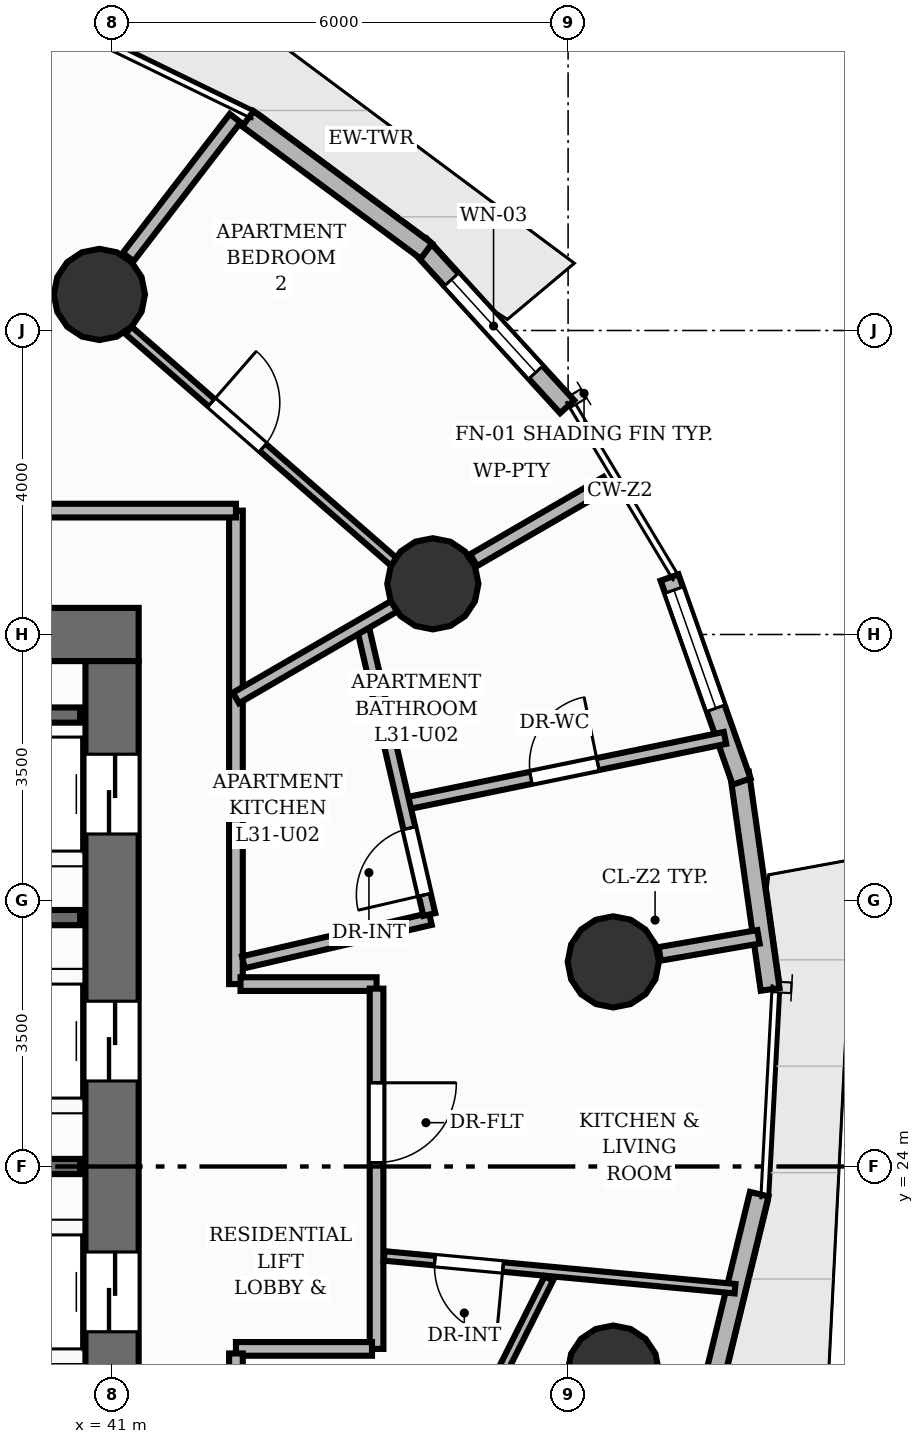
"""IFC4 building model, lengths in metres.
Left out: names, types, materials, properties, quantities, classifications, styles, units other than length and angle.
Written with IfcOpenShell. Run it as: python <this file> out.ifc"""

import sys

from ifc_helpers import new_model, si_unit, direction, frame, frame_2d, origin, origin_2d, place, context, subcontext, project, spatial, rectangle, circle, extrude, element, fill, save


model = new_model("IFC4")
c1 = context("Model", 3, precision=1e-05, world=origin(), true_north=direction((0.0, 1.0)))
c2 = subcontext(c1, "Body", "Model", "MODEL_VIEW")
j1 = project(units=[si_unit("LENGTHUNIT", "METRE"), si_unit("PLANEANGLEUNIT", "RADIAN")], contexts=[c1])
p1 = place(None, origin())
s1 = spatial("IfcSite", under=j1, at=p1, CompositionType="ELEMENT")
p2 = place(p1, origin())
s2 = spatial("IfcBuilding", under=s1, at=p2, CompositionType="ELEMENT")
p3 = place(p2, frame((0.0, 0.0, 106.08)))
s3 = spatial("IfcBuildingStorey", under=s2, at=p3, CompositionType="ELEMENT", Elevation=106.08)
p4 = place(p3, frame((22.65, 31.0, 0.0), z_axis=(0.0, 0.0, 1.0), x_axis=(1.0, 0.0, 0.0)))
e1 = element("IfcWall", 1, at=p4, inside=s3, PredefinedType="SHEAR", context=c2, shape_type="SweptSolid", body=[
    extrude(rectangle(XDim=18.7, YDim=0.7, at=frame_2d((9.35, 0.0))), origin(), (0.0, 0.0, 1.0), 3.2),
])
p5 = place(p4, frame((11.75, 0.0, 0.0)))
e2 = element("IfcOpeningElement", 2, at=p5, cuts=e1, PredefinedType="OPENING", context=c2, shape_type="SweptSolid", body=[
    extrude(rectangle(XDim=1.1, YDim=2.15, at=frame_2d((0.55, 1.075))), frame((0.0, 0.36, 0.0), z_axis=(0.0, -1.0, 0.0), x_axis=(1.0, 0.0, 0.0)), (0.0, 0.0, 1.0), 0.72),
])
p6 = place(p3, frame((41.0, 17.35, 0.0), z_axis=(0.0, 0.0, 1.0), x_axis=(0.0, 1.0, 0.0)))
e3 = element("IfcWall", 3, at=p6, inside=s3, PredefinedType="SHEAR", context=c2, shape_type="SweptSolid", body=[
    extrude(rectangle(XDim=13.3, YDim=0.7, at=frame_2d((6.65, 0.0))), origin(), (0.0, 0.0, 1.0), 3.2),
])
p7 = place(p6, frame((1.225, 0.0, 0.0)))
e4 = element("IfcOpeningElement", 4, at=p7, cuts=e3, PredefinedType="OPENING", context=c2, shape_type="SweptSolid", body=[
    extrude(rectangle(XDim=1.05, YDim=2.15, at=frame_2d((0.525, 1.075))), frame((0.0, 0.36, 0.0), z_axis=(0.0, -1.0, 0.0), x_axis=(1.0, 0.0, 0.0)), (0.0, 0.0, 1.0), 0.72),
])
p8 = place(p6, frame((4.475, 0.0, 0.0)))
e5 = element("IfcOpeningElement", 5, at=p8, cuts=e3, PredefinedType="OPENING", context=c2, shape_type="SweptSolid", body=[
    extrude(rectangle(XDim=1.05, YDim=2.15, at=frame_2d((0.525, 1.075))), frame((0.0, 0.36, 0.0), z_axis=(0.0, -1.0, 0.0), x_axis=(1.0, 0.0, 0.0)), (0.0, 0.0, 1.0), 0.72),
])
p9 = place(p6, frame((7.775, 0.0, 0.0)))
e6 = element("IfcOpeningElement", 6, at=p9, cuts=e3, PredefinedType="OPENING", context=c2, shape_type="SweptSolid", body=[
    extrude(rectangle(XDim=1.05, YDim=2.15, at=frame_2d((0.525, 1.075))), frame((0.0, 0.36, 0.0), z_axis=(0.0, -1.0, 0.0), x_axis=(1.0, 0.0, 0.0)), (0.0, 0.0, 1.0), 0.72),
])
p10 = place(p6, frame((11.025, 0.0, 0.0)))
e7 = element("IfcOpeningElement", 7, at=p10, cuts=e3, PredefinedType="OPENING", context=c2, shape_type="SweptSolid", body=[
    extrude(rectangle(XDim=1.05, YDim=2.15, at=frame_2d((0.525, 1.075))), frame((0.0, 0.36, 0.0), z_axis=(0.0, -1.0, 0.0), x_axis=(1.0, 0.0, 0.0)), (0.0, 0.0, 1.0), 0.72),
])
for number, where, z_axis, x_axis in (
    (8, (47.594, 26.692, 0.0), (0.0, 0.0, 1.0), (1.0, 0.0, 0.0)),
    (9, (45.22, 31.667, 0.0), (0.0, 0.0, 1.0), (1.0, 0.0, 0.0)),
    (10, (40.833, 35.474, 0.0), (0.0, 0.0, 1.0), (1.0, 0.0, 0.0)),
    (11, (47.594, 21.308, 0.0), (0.0, 0.0, 1.0), (1.0, 0.0, 0.0)),
):
    element("IfcColumn", number, at=place(p3, frame(where, z_axis=z_axis, x_axis=x_axis)), inside=s3, PredefinedType="COLUMN", context=c2, shape_type="SweptSolid", body=[
        extrude(circle(Radius=0.6, at=origin_2d()), origin(), (0.0, 0.0, 1.0), 3.2),
    ])
p11 = place(p3, frame((45.051, 36.121, 0.0), z_axis=(0.0, 0.0, 1.0), x_axis=(0.673691100196, -0.739013059098, 0.0)))
e12 = element("IfcWall", 12, at=p11, inside=s3, PredefinedType="SOLIDWALL", context=c2, shape_type="SweptSolid", body=[
    extrude(rectangle(XDim=2.874, YDim=0.25, at=frame_2d((1.437, 0.0))), origin(), (0.0, 0.0, 1.0), 2.96),
])
p12 = place(p11, frame((0.612, 0.0, 0.85)))
e13 = element("IfcOpeningElement", 13, at=p12, cuts=e12, PredefinedType="OPENING", context=c2, shape_type="SweptSolid", body=[
    extrude(rectangle(XDim=1.65, YDim=1.55, at=frame_2d((0.825, 0.775))), frame((0.0, 0.135, 0.0), z_axis=(0.0, -1.0, 0.0), x_axis=(1.0, 0.0, 0.0)), (0.0, 0.0, 1.0), 0.27),
])
p13 = place(p3, frame((42.787, 37.785, 0.0), z_axis=(0.0, 0.0, 1.0), x_axis=(0.803255279066, -0.595634918933, 0.0)))
e14 = element("IfcWall", 14, at=p13, inside=s3, PredefinedType="SOLIDWALL", context=c2, shape_type="SweptSolid", body=[
    extrude(rectangle(XDim=2.923, YDim=0.25, at=frame_2d((1.462, 0.0))), origin(), (0.0, 0.0, 1.0), 2.96),
])
p14 = place(p3, frame((49.514, 23.636, 0.0), z_axis=(0.0, 0.0, 1.0), x_axis=(-0.236668427837, -0.971590477138, 0.0)))
e15 = element("IfcWall", 15, at=p14, inside=s3, PredefinedType="SOLIDWALL", context=c2, shape_type="SweptSolid", body=[
    extrude(rectangle(XDim=2.989, YDim=0.25, at=frame_2d((1.494, 0.0))), origin(), (0.0, 0.0, 1.0), 2.96),
])
p15 = place(p3, frame((49.256, 29.176, 0.0), z_axis=(0.0, 0.0, 1.0), x_axis=(0.139982311006, -0.990154004489, 0.0)))
e16 = element("IfcWall", 16, at=p15, inside=s3, PredefinedType="SOLIDWALL", context=c2, shape_type="SweptSolid", body=[
    extrude(rectangle(XDim=2.874, YDim=0.25, at=frame_2d((1.437, 0.0))), origin(), (0.0, 0.0, 1.0), 2.96),
])
p16 = place(p3, frame((48.335, 31.75, 0.0), z_axis=(0.0, 0.0, 1.0), x_axis=(0.332923265962, -0.942953921982, 0.0)))
e17 = element("IfcWall", 17, at=p16, inside=s3, PredefinedType="SOLIDWALL", context=c2, shape_type="SweptSolid", body=[
    extrude(rectangle(XDim=2.847, YDim=0.25, at=frame_2d((1.424, 0.0))), origin(), (0.0, 0.0, 1.0), 2.96),
])
p17 = place(p16, frame((0.175, 0.0, 0.85)))
e18 = element("IfcOpeningElement", 18, at=p17, cuts=e17, PredefinedType="OPENING", context=c2, shape_type="SweptSolid", body=[
    extrude(rectangle(XDim=1.65, YDim=1.55, at=frame_2d((0.825, 0.775))), frame((0.0, 0.135, 0.0), z_axis=(0.0, -1.0, 0.0), x_axis=(1.0, 0.0, 0.0)), (0.0, 0.0, 1.0), 0.27),
])
for number, where, z_axis, x_axis in (
    (19, (38.87, 29.94, 0.0), (0.0, 0.0, 1.0), (1.0, 0.0, 0.0)),
    (20, (38.87, 24.0, 0.0), (0.0, 0.0, 1.0), (1.0, 0.0, 0.0)),
    (21, (38.87, 27.275, 0.0), (0.0, 0.0, 1.0), (1.0, 0.0, 0.0)),
):
    element("IfcWall", number, at=place(p3, frame(where, z_axis=z_axis, x_axis=x_axis)), inside=s3, PredefinedType="SHEAR", context=c2, shape_type="SweptSolid", body=[
        extrude(rectangle(XDim=1.71, YDim=0.2, at=frame_2d((0.855, 0.0))), origin(), (0.0, 0.0, 1.0), 3.2),
    ])
p18 = place(p3, frame((48.206, 26.798, 0.0), z_axis=(0.0, 0.0, 1.0), x_axis=(0.98541625201, 0.170161130326, 0.0)))
e22 = element("IfcWall", 22, at=p18, inside=s3, PredefinedType="PARTITIONING", context=c2, shape_type="SweptSolid", body=[
    extrude(rectangle(XDim=1.319, YDim=0.18, at=frame_2d((0.659, 0.0))), origin(), (0.0, 0.0, 1.0), 2.26),
])
p19 = place(p3, frame((45.757, 31.978, 0.0), z_axis=(0.0, 0.0, 1.0), x_axis=(0.865046864493, 0.501691062539, 0.0)))
e23 = element("IfcWall", 23, at=p19, inside=s3, PredefinedType="PARTITIONING", context=c2, shape_type="SweptSolid", body=[
    extrude(rectangle(XDim=2.028, YDim=0.18, at=frame_2d((1.014, 0.0))), origin(), (0.0, 0.0, 1.0), 2.26),
])
p20 = place(p3, frame((41.212, 35.966, 0.0), z_axis=(0.0, 0.0, 1.0), x_axis=(0.610007255548, 0.792395827967, 0.0)))
e24 = element("IfcWall", 24, at=p20, inside=s3, PredefinedType="PARTITIONING", context=c2, shape_type="SweptSolid", body=[
    extrude(rectangle(XDim=2.308, YDim=0.18, at=frame_2d((1.154, 0.0))), origin(), (0.0, 0.0, 1.0), 2.26),
])
p21 = place(p3, frame((42.63, 32.63, 0.0), z_axis=(0.0, 0.0, 1.0), x_axis=(0.0, -1.0, 0.0)))
e25 = element("IfcWall", 25, at=p21, inside=s3, PredefinedType="PARTITIONING", context=c2, shape_type="SweptSolid", body=[
    extrude(rectangle(XDim=6.23, YDim=0.18, at=frame_2d((3.115, 0.0))), origin(), (0.0, 0.0, 1.0), 2.955),
])
p22 = place(p3, frame((42.69, 26.4, 0.0), z_axis=(0.0, 0.0, 1.0), x_axis=(1.0, 0.0, 0.0)))
e26 = element("IfcWall", 26, at=p22, inside=s3, PredefinedType="PARTITIONING", context=c2, shape_type="SweptSolid", body=[
    extrude(rectangle(XDim=1.79, YDim=0.18, at=frame_2d((0.895, 0.0))), origin(), (0.0, 0.0, 1.0), 2.26),
])
p23 = place(p3, frame((44.48, 26.34, 0.0), z_axis=(0.0, 0.0, 1.0), x_axis=(0.0, -1.0, 0.0)))
e27 = element("IfcWall", 27, at=p23, inside=s3, PredefinedType="PARTITIONING", context=c2, shape_type="SweptSolid", body=[
    extrude(rectangle(XDim=4.74, YDim=0.18, at=frame_2d((2.37, 0.0))), origin(), (0.0, 0.0, 1.0), 2.955),
])
p24 = place(p23, frame((1.239, 0.0, 0.0)))
e28 = element("IfcOpeningElement", 28, at=p24, cuts=e27, PredefinedType="OPENING", context=c2, shape_type="SweptSolid", body=[
    extrude(rectangle(XDim=1.05, YDim=2.15, at=frame_2d((0.525, 1.075))), frame((0.0, 0.1, 0.0), z_axis=(0.0, -1.0, 0.0), x_axis=(1.0, 0.0, 0.0)), (0.0, 0.0, 1.0), 0.2),
])
p25 = place(p3, frame((44.42, 21.6, 0.0), z_axis=(0.0, 0.0, 1.0), x_axis=(-1.0, 0.0, 0.0)))
e29 = element("IfcWall", 29, at=p25, inside=s3, PredefinedType="PARTITIONING", context=c2, shape_type="SweptSolid", body=[
    extrude(rectangle(XDim=1.79, YDim=0.18, at=frame_2d((0.895, 0.0))), origin(), (0.0, 0.0, 1.0), 2.26),
])
p26 = place(p3, frame((42.63, 21.54, 0.0), z_axis=(0.0, 0.0, 1.0), x_axis=(0.0, -1.0, 0.0)))
e30 = element("IfcWall", 30, at=p26, inside=s3, PredefinedType="PARTITIONING", context=c2, shape_type="SweptSolid", body=[
    extrude(rectangle(XDim=6.17, YDim=0.18, at=frame_2d((3.085, 0.0))), origin(), (0.0, 0.0, 1.0), 2.955),
])
p27 = place(p3, frame((22.734, 32.63, 0.0), z_axis=(0.0, 0.0, 1.0), x_axis=(1.0, 0.0, 0.0)))
e31 = element("IfcWall", 31, at=p27, inside=s3, PredefinedType="PARTITIONING", context=c2, shape_type="SweptSolid", body=[
    extrude(rectangle(XDim=19.896, YDim=0.18, at=frame_2d((9.948, 0.0))), origin(), (0.0, 0.0, 1.0), 2.955),
])
p28 = place(p27, frame((11.004, 0.0, 0.0)))
e32 = element("IfcOpeningElement", 32, at=p28, cuts=e31, PredefinedType="OPENING", context=c2, shape_type="SweptSolid", body=[
    extrude(rectangle(XDim=1.05, YDim=2.15, at=frame_2d((0.525, 1.075))), frame((0.0, 0.1, 0.0), z_axis=(0.0, -1.0, 0.0), x_axis=(1.0, 0.0, 0.0)), (0.0, 0.0, 1.0), 0.2),
])
p29 = place(p3, frame((44.838, 28.77, 0.0), z_axis=(0.0, 0.0, 1.0), x_axis=(0.97949547816, 0.201466146695, 0.0)))
e33 = element("IfcWall", 33, at=p29, inside=s3, PredefinedType="PLUMBINGWALL", context=c2, shape_type="SweptSolid", body=[
    extrude(rectangle(XDim=4.315, YDim=0.16, at=frame_2d((2.158, 0.0))), origin(), (0.0, 0.0, 1.0), 2.955),
])
p30 = place(p29, frame((1.708, 0.0, 0.0)))
e34 = element("IfcOpeningElement", 34, at=p30, cuts=e33, PredefinedType="OPENING", context=c2, shape_type="SweptSolid", body=[
    extrude(rectangle(XDim=0.9, YDim=2.1, at=frame_2d((0.45, 1.05))), frame((0.0, 0.09, 0.0), z_axis=(0.0, -1.0, 0.0), x_axis=(1.0, 0.0, 0.0)), (0.0, 0.0, 1.0), 0.18),
])
p31 = place(p3, frame((49.196, 22.392, 0.0), z_axis=(0.0, 0.0, 1.0), x_axis=(-0.99565683003, 0.09309928472, 0.0)))
e35 = element("IfcWall", 35, at=p31, inside=s3, PredefinedType="PARTITIONING", context=c2, shape_type="SweptSolid", body=[
    extrude(rectangle(XDim=4.636, YDim=0.125, at=frame_2d((2.318, 0.0))), origin(), (0.0, 0.0, 1.0), 2.955),
])
p32 = place(p31, frame((3.066, 0.0, 0.0)))
e36 = element("IfcOpeningElement", 36, at=p32, cuts=e35, PredefinedType="OPENING", context=c2, shape_type="SweptSolid", body=[
    extrude(rectangle(XDim=0.9, YDim=2.1, at=frame_2d((0.45, 1.05))), frame((0.0, 0.073, 0.0), z_axis=(0.0, -1.0, 0.0), x_axis=(1.0, 0.0, 0.0)), (0.0, 0.0, 1.0), 0.145),
])
p33 = place(p3, frame((42.727, 26.688, 0.0), z_axis=(0.0, 0.0, 1.0), x_axis=(0.974262333638, 0.225417180479, 0.0)))
e37 = element("IfcWall", 37, at=p33, inside=s3, PredefinedType="PLUMBINGWALL", context=c2, shape_type="SweptSolid", body=[
    extrude(rectangle(XDim=2.526, YDim=0.16, at=frame_2d((1.263, 0.0))), origin(), (0.0, 0.0, 1.0), 2.955),
])
p34 = place(p3, frame((45.174, 27.315, 0.0), z_axis=(0.0, 0.0, 1.0), x_axis=(-0.225561032487, 0.974229039099, 0.0)))
e38 = element("IfcWall", 38, at=p34, inside=s3, PredefinedType="PLUMBINGWALL", context=c2, shape_type="SweptSolid", body=[
    extrude(rectangle(XDim=3.914, YDim=0.16, at=frame_2d((1.957, 0.0))), origin(), (0.0, 0.0, 1.0), 2.955),
])
p35 = place(p34, frame((0.266, 0.0, 0.0)))
e39 = element("IfcOpeningElement", 39, at=p35, cuts=e38, PredefinedType="OPENING", context=c2, shape_type="SweptSolid", body=[
    extrude(rectangle(XDim=0.9, YDim=2.1, at=frame_2d((0.45, 1.05))), frame((0.0, 0.09, 0.0), z_axis=(0.0, -1.0, 0.0), x_axis=(1.0, 0.0, 0.0)), (0.0, 0.0, 1.0), 0.18),
])
p36 = place(p3, frame((42.63, 30.165, 0.0), z_axis=(0.0, 0.0, 1.0), x_axis=(0.865092804374, 0.501611841786, 0.0)))
e40 = element("IfcWall", 40, at=p36, inside=s3, PredefinedType="PLUMBINGWALL", context=c2, shape_type="SweptSolid", body=[
    extrude(rectangle(XDim=2.407, YDim=0.16, at=frame_2d((1.204, 0.0))), origin(), (0.0, 0.0, 1.0), 2.26),
])
p37 = place(p3, frame((46.746, 22.528, 0.0), z_axis=(0.0, 0.0, 1.0), x_axis=(-0.448357094434, -0.893854527242, 0.0)))
e41 = element("IfcWall", 41, at=p37, inside=s3, PredefinedType="PARTITIONING", context=c2, shape_type="SweptSolid", body=[
    extrude(rectangle(XDim=11.611, YDim=0.125, at=frame_2d((5.805, 0.0))), origin(), (0.0, 0.0, 1.0), 2.403),
])
p38 = place(p37, frame((4.375, 0.0, 0.0)))
e42 = element("IfcOpeningElement", 42, at=p38, cuts=e41, PredefinedType="OPENING", context=c2, shape_type="SweptSolid", body=[
    extrude(rectangle(XDim=0.9, YDim=2.1, at=frame_2d((0.45, 1.05))), frame((0.0, 0.073, 0.0), z_axis=(0.0, -1.0, 0.0), x_axis=(1.0, 0.0, 0.0)), (0.0, 0.0, 1.0), 0.145),
])
p39 = place(p3, frame((41.216, 35.003, 0.0), z_axis=(0.0, 0.0, 1.0), x_axis=(0.753372011099, -0.657594565741, 0.0)))
e43 = element("IfcWall", 43, at=p39, inside=s3, PredefinedType="PARTITIONING", context=c2, shape_type="SweptSolid", body=[
    extrude(rectangle(XDim=4.637, YDim=0.125, at=frame_2d((2.318, 0.0))), origin(), (0.0, 0.0, 1.0), 2.403),
])
p40 = place(p39, frame((1.448, 0.0, 0.0)))
e44 = element("IfcOpeningElement", 44, at=p40, cuts=e43, PredefinedType="OPENING", context=c2, shape_type="SweptSolid", body=[
    extrude(rectangle(XDim=0.9, YDim=2.1, at=frame_2d((0.45, 1.05))), frame((0.0, 0.073, 0.0), z_axis=(0.0, -1.0, 0.0), x_axis=(1.0, 0.0, 0.0)), (0.0, 0.0, 1.0), 0.145),
])
p41 = place(p12, origin())
e45 = element("IfcWindow", 45, at=p41, inside=s3, PartitioningType="SINGLE_PANEL", PredefinedType="WINDOW", context=c2, shape_type="SweptSolid", body=[
    extrude(rectangle(XDim=1.65, YDim=1.55, at=frame_2d((0.825, 0.775))), frame((0.0, 0.03, 0.0), z_axis=(0.0, -1.0, 0.0), x_axis=(1.0, 0.0, 0.0)), (0.0, 0.0, 1.0), 0.06),
])
fill(e13, e45)
p42 = place(p17, origin())
e46 = element("IfcWindow", 46, at=p42, inside=s3, PartitioningType="SINGLE_PANEL", PredefinedType="WINDOW", context=c2, shape_type="SweptSolid", body=[
    extrude(rectangle(XDim=1.65, YDim=1.55, at=frame_2d((0.825, 0.775))), frame((0.0, 0.03, 0.0), z_axis=(0.0, -1.0, 0.0), x_axis=(1.0, 0.0, 0.0)), (0.0, 0.0, 1.0), 0.06),
])
fill(e18, e46)
p43 = place(p8, origin())
e47 = element("IfcDoor", 47, at=p43, inside=s3, OperationType="DOUBLE_DOOR_SLIDING", PredefinedType="DOOR", context=c2, shape_type="SweptSolid", body=[
    extrude(rectangle(XDim=1.05, YDim=2.15, at=frame_2d((0.525, 1.075))), frame((0.0, 0.025, 0.0), z_axis=(0.0, -1.0, 0.0), x_axis=(1.0, 0.0, 0.0)), (0.0, 0.0, 1.0), 0.05),
])
fill(e5, e47)
p44 = place(p9, origin())
e48 = element("IfcDoor", 48, at=p44, inside=s3, OperationType="DOUBLE_DOOR_SLIDING", PredefinedType="DOOR", context=c2, shape_type="SweptSolid", body=[
    extrude(rectangle(XDim=1.05, YDim=2.15, at=frame_2d((0.525, 1.075))), frame((0.0, 0.025, 0.0), z_axis=(0.0, -1.0, 0.0), x_axis=(1.0, 0.0, 0.0)), (0.0, 0.0, 1.0), 0.05),
])
fill(e6, e48)
p45 = place(p10, origin())
e49 = element("IfcDoor", 49, at=p45, inside=s3, OperationType="DOUBLE_DOOR_SLIDING", PredefinedType="DOOR", context=c2, shape_type="SweptSolid", body=[
    extrude(rectangle(XDim=1.05, YDim=2.15, at=frame_2d((0.525, 1.075))), frame((0.0, 0.025, 0.0), z_axis=(0.0, -1.0, 0.0), x_axis=(1.0, 0.0, 0.0)), (0.0, 0.0, 1.0), 0.05),
])
fill(e7, e49)
p46 = place(p24, origin())
e50 = element("IfcDoor", 50, at=p46, inside=s3, OperationType="SINGLE_SWING_LEFT", PredefinedType="DOOR", context=c2, shape_type="SweptSolid", body=[
    extrude(rectangle(XDim=1.05, YDim=2.15, at=frame_2d((0.525, 1.075))), frame((0.0, 0.025, 0.0), z_axis=(0.0, -1.0, 0.0), x_axis=(1.0, 0.0, 0.0)), (0.0, 0.0, 1.0), 0.05),
])
fill(e28, e50)
p47 = place(p30, origin())
e51 = element("IfcDoor", 51, at=p47, inside=s3, OperationType="SINGLE_SWING_RIGHT", PredefinedType="DOOR", context=c2, shape_type="SweptSolid", body=[
    extrude(rectangle(XDim=0.9, YDim=2.1, at=frame_2d((0.45, 1.05))), frame((0.0, 0.025, 0.0), z_axis=(0.0, -1.0, 0.0), x_axis=(1.0, 0.0, 0.0)), (0.0, 0.0, 1.0), 0.05),
])
fill(e34, e51)
p48 = place(p32, origin())
e52 = element("IfcDoor", 52, at=p48, inside=s3, OperationType="SINGLE_SWING_LEFT", PredefinedType="DOOR", context=c2, shape_type="SweptSolid", body=[
    extrude(rectangle(XDim=0.9, YDim=2.1, at=frame_2d((0.45, 1.05))), frame((0.0, 0.025, 0.0), z_axis=(0.0, -1.0, 0.0), x_axis=(1.0, 0.0, 0.0)), (0.0, 0.0, 1.0), 0.05),
])
fill(e36, e52)
p49 = place(p35, origin())
e53 = element("IfcDoor", 53, at=p49, inside=s3, OperationType="SINGLE_SWING_LEFT", PredefinedType="DOOR", context=c2, shape_type="SweptSolid", body=[
    extrude(rectangle(XDim=0.9, YDim=2.1, at=frame_2d((0.45, 1.05))), frame((0.0, 0.025, 0.0), z_axis=(0.0, -1.0, 0.0), x_axis=(1.0, 0.0, 0.0)), (0.0, 0.0, 1.0), 0.05),
])
fill(e39, e53)
p50 = place(p40, origin())
e54 = element("IfcDoor", 54, at=p50, inside=s3, OperationType="SINGLE_SWING_LEFT", PredefinedType="DOOR", context=c2, shape_type="SweptSolid", body=[
    extrude(rectangle(XDim=0.9, YDim=2.1, at=frame_2d((0.45, 1.05))), frame((0.0, 0.025, 0.0), z_axis=(0.0, -1.0, 0.0), x_axis=(1.0, 0.0, 0.0)), (0.0, 0.0, 1.0), 0.05),
])
fill(e44, e54)
save(model, sys.argv[1])
